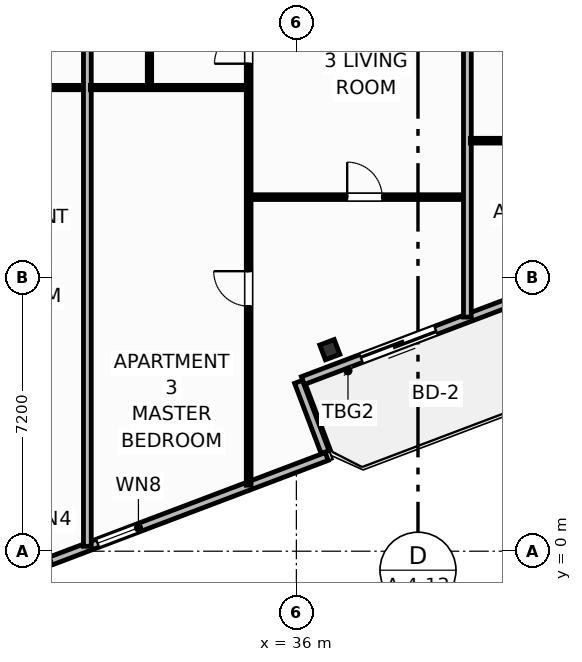
"""IFC4 building model, lengths in metres.
Left out: names, types, materials, properties, quantities, classifications, styles, units other than length and angle.
Written with IfcOpenShell. Run it as: python <this file> out.ifc"""

import sys

from ifc_helpers import new_model, si_unit, direction, frame, frame_2d, origin, origin_2d, place, context, subcontext, project, spatial, rectangle, i_section, extrude, element, fill, save


model = new_model("IFC4")
c1 = context("Model", 3, precision=1e-05, world=origin(), true_north=direction((0.0, 1.0)))
c2 = subcontext(c1, "Body", "Model", "MODEL_VIEW")
j1 = project(units=[si_unit("LENGTHUNIT", "METRE"), si_unit("PLANEANGLEUNIT", "RADIAN")], contexts=[c1])
p1 = place(None, origin())
s1 = spatial("IfcSite", under=j1, at=p1, CompositionType="ELEMENT")
p2 = place(p1, origin())
s2 = spatial("IfcBuilding", under=s1, at=p2, CompositionType="ELEMENT")
p3 = place(p2, frame((0.0, 0.0, 216.4)))
s3 = spatial("IfcBuildingStorey", under=s2, at=p3, CompositionType="ELEMENT", Elevation=216.4)
p4 = place(p3, frame((36.88, 5.303, 0.0), z_axis=(0.0, 0.0, 1.0), x_axis=(0.935221751401, 0.354062530786, 0.0)))
e1 = element("IfcColumn", 1, at=p4, inside=s3, PredefinedType="COLUMN", context=c2, shape_type="SweptSolid", body=[
    extrude(i_section(OverallWidth=0.406, OverallDepth=0.416, WebThickness=0.03, FlangeThickness=0.048, FilletRadius=0.025, at=origin_2d()), origin(), (0.0, 0.0, 1.0), 3.7),
])
p5 = place(p3, frame((41.783, 6.614, 0.0), z_axis=(0.0, 0.0, 1.0), x_axis=(-0.93521416643, -0.354082565101, 0.0)))
e2 = element("IfcWall", 2, at=p5, inside=s3, PredefinedType="SOLIDWALL", context=c2, shape_type="SweptSolid", body=[
    extrude(rectangle(XDim=6.0, YDim=0.22, at=frame_2d((3.0, 0.0))), origin(), (0.0, 0.0, 1.0), 2.73),
])
p6 = place(p5, frame((2.26, 0.0, 0.0)))
e3 = element("IfcOpeningElement", 3, at=p6, cuts=e2, PredefinedType="OPENING", context=c2, shape_type="SweptSolid", body=[
    extrude(rectangle(XDim=2.1, YDim=2.3, at=frame_2d((1.05, 1.15))), frame((0.0, 0.12, 0.0), z_axis=(0.0, -1.0, 0.0), x_axis=(1.0, 0.0, 0.0)), (0.0, 0.0, 1.0), 0.24),
])
p7 = place(p3, frame((20.202, -3.791, 0.0), z_axis=(0.0, 0.0, 1.0), x_axis=(0.935225574232, 0.354052432984, 0.0)))
e4 = element("IfcWall", 4, at=p7, inside=s3, PredefinedType="SOLIDWALL", context=c2, shape_type="SweptSolid", body=[
    extrude(rectangle(XDim=17.747, YDim=0.22, at=frame_2d((8.874, 0.0))), origin(), (0.0, 0.0, 1.0), 2.73),
])
p8 = place(p7, frame((7.823, 0.0, 0.8)))
e5 = element("IfcOpeningElement", 5, at=p8, cuts=e4, PredefinedType="OPENING", context=c2, shape_type="SweptSolid", body=[
    extrude(rectangle(XDim=2.1, YDim=1.75, at=frame_2d((1.05, 0.875))), frame((0.0, 0.12, 0.0), z_axis=(0.0, -1.0, 0.0), x_axis=(1.0, 0.0, 0.0)), (0.0, 0.0, 1.0), 0.24),
])
p9 = place(p7, frame((11.298, 0.0, 0.8)))
e6 = element("IfcOpeningElement", 6, at=p9, cuts=e4, PredefinedType="OPENING", context=c2, shape_type="SweptSolid", body=[
    extrude(rectangle(XDim=1.15, YDim=1.4, at=frame_2d((0.575, 0.7))), frame((0.0, 0.12, 0.0), z_axis=(0.0, -1.0, 0.0), x_axis=(1.0, 0.0, 0.0)), (0.0, 0.0, 1.0), 0.24),
])
p10 = place(p3, frame((36.755, 2.61, 0.0), z_axis=(0.0, 0.0, 1.0), x_axis=(-0.354020680661, 0.935237594232, 0.0)))
e7 = element("IfcWall", 7, at=p10, inside=s3, PredefinedType="SOLIDWALL", context=c2, shape_type="SweptSolid", body=[
    extrude(rectangle(XDim=1.975, YDim=0.22, at=frame_2d((0.988, 0.0))), origin(), (0.0, 0.0, 1.0), 2.73),
])
p11 = place(p3, frame((26.325, 12.2, 0.0), z_axis=(0.0, 0.0, 1.0), x_axis=(1.0, 0.0, 0.0)))
e8 = element("IfcWall", 8, at=p11, inside=s3, PredefinedType="PARTITIONING", context=c2, shape_type="SweptSolid", body=[
    extrude(rectangle(XDim=4.095, YDim=0.115, at=frame_2d((2.047, 0.0))), origin(), (0.0, 0.0, 1.0), 3.45),
])
p12 = place(p3, frame((30.5, 0.129, 0.0), z_axis=(0.0, 0.0, 1.0), x_axis=(0.0, 1.0, 0.0)))
e9 = element("IfcWall", 9, at=p12, inside=s3, PredefinedType="PARTITIONING", context=c2, shape_type="SweptSolid", body=[
    extrude(rectangle(XDim=16.721, YDim=0.205, at=frame_2d((8.36, 0.0))), origin(), (0.0, 0.0, 1.0), 3.45),
])
p13 = place(p3, frame((34.815, 9.317, 0.0), z_axis=(0.0, 0.0, 1.0), x_axis=(1.0, 0.0, 0.0)))
e10 = element("IfcWall", 10, at=p13, inside=s3, PredefinedType="PARTITIONING", context=c2, shape_type="SweptSolid", body=[
    extrude(rectangle(XDim=5.605, YDim=0.125, at=frame_2d((2.803, 0.0))), origin(), (0.0, 0.0, 1.0), 3.45),
])
p14 = place(p13, frame((2.522, 0.0, 0.0)))
e11 = element("IfcOpeningElement", 11, at=p14, cuts=e10, PredefinedType="OPENING", context=c2, shape_type="SweptSolid", body=[
    extrude(rectangle(XDim=0.92, YDim=2.05, at=frame_2d((0.46, 1.025))), frame((0.0, 0.073, 0.0), z_axis=(0.0, -1.0, 0.0), x_axis=(1.0, 0.0, 0.0)), (0.0, 0.0, 1.0), 0.145),
])
p15 = place(p3, frame((34.745, 1.736, 0.0), z_axis=(0.0, 0.0, 1.0), x_axis=(0.0, 1.0, 0.0)))
e12 = element("IfcWall", 12, at=p15, inside=s3, PredefinedType="PARTITIONING", context=c2, shape_type="SweptSolid", body=[
    extrude(rectangle(XDim=15.114, YDim=0.125, at=frame_2d((7.557, 0.0))), origin(), (0.0, 0.0, 1.0), 2.739),
])
p16 = place(p15, frame((4.712, 0.0, 0.0)))
e13 = element("IfcOpeningElement", 13, at=p16, cuts=e12, PredefinedType="OPENING", context=c2, shape_type="SweptSolid", body=[
    extrude(rectangle(XDim=0.92, YDim=2.05, at=frame_2d((0.46, 1.025))), frame((0.0, 0.073, 0.0), z_axis=(0.0, -1.0, 0.0), x_axis=(1.0, 0.0, 0.0)), (0.0, 0.0, 1.0), 0.145),
])
p17 = place(p15, frame((11.091, 0.0, 0.0)))
e14 = element("IfcOpeningElement", 14, at=p17, cuts=e12, PredefinedType="OPENING", context=c2, shape_type="SweptSolid", body=[
    extrude(rectangle(XDim=0.9, YDim=2.05, at=frame_2d((0.45, 1.025))), frame((0.0, 0.073, 0.0), z_axis=(0.0, -1.0, 0.0), x_axis=(1.0, 0.0, 0.0)), (0.0, 0.0, 1.0), 0.145),
])
p18 = place(p15, frame((13.384, 0.0, 0.0)))
e15 = element("IfcOpeningElement", 15, at=p18, cuts=e12, PredefinedType="OPENING", context=c2, shape_type="SweptSolid", body=[
    extrude(rectangle(XDim=0.92, YDim=2.05, at=frame_2d((0.46, 1.025))), frame((0.0, 0.073, 0.0), z_axis=(0.0, -1.0, 0.0), x_axis=(1.0, 0.0, 0.0)), (0.0, 0.0, 1.0), 0.145),
])
p19 = place(p3, frame((30.58, 12.2, 0.0), z_axis=(0.0, 0.0, 1.0), x_axis=(1.0, 0.0, 0.0)))
e16 = element("IfcWall", 16, at=p19, inside=s3, PredefinedType="PARTITIONING", context=c2, shape_type="SweptSolid", body=[
    extrude(rectangle(XDim=4.095, YDim=0.115, at=frame_2d((2.047, 0.0))), origin(), (0.0, 0.0, 1.0), 3.45),
])
p20 = place(p3, frame((32.135, 12.2, 0.0), z_axis=(0.0, 0.0, 1.0), x_axis=(0.0, 1.0, 0.0)))
e17 = element("IfcWall", 17, at=p20, inside=s3, PredefinedType="PARTITIONING", context=c2, shape_type="SweptSolid", body=[
    extrude(rectangle(XDim=2.24, YDim=0.115, at=frame_2d((1.12, 0.0))), origin(), (0.0, 0.0, 1.0), 3.45),
])
p21 = place(p3, frame((40.5, 6.16, 0.0), z_axis=(0.0, 0.0, 1.0), x_axis=(0.0, 1.0, 0.0)))
e18 = element("IfcWall", 18, at=p21, inside=s3, PredefinedType="PARTITIONING", context=c2, shape_type="SweptSolid", body=[
    extrude(rectangle(XDim=10.69, YDim=0.205, at=frame_2d((5.345, 0.0))), origin(), (0.0, 0.0, 1.0), 3.45),
])
p22 = place(p3, frame((40.58, 10.802, 0.0), z_axis=(0.0, 0.0, 1.0), x_axis=(1.0, 0.0, 0.0)))
e19 = element("IfcWall", 19, at=p22, inside=s3, PredefinedType="PARTITIONING", context=c2, shape_type="SweptSolid", body=[
    extrude(rectangle(XDim=5.605, YDim=0.125, at=frame_2d((2.803, 0.0))), origin(), (0.0, 0.0, 1.0), 3.45),
])
p23 = place(p22, frame((2.522, 0.0, 0.0)))
e20 = element("IfcOpeningElement", 20, at=p23, cuts=e19, PredefinedType="OPENING", context=c2, shape_type="SweptSolid", body=[
    extrude(rectangle(XDim=0.92, YDim=2.05, at=frame_2d((0.46, 1.025))), frame((0.0, 0.073, 0.0), z_axis=(0.0, -1.0, 0.0), x_axis=(1.0, 0.0, 0.0)), (0.0, 0.0, 1.0), 0.145),
])
p24 = place(p6, origin())
e21 = element("IfcDoor", 21, at=p24, inside=s3, OperationType="SLIDING_TO_LEFT", PredefinedType="DOOR", context=c2, shape_type="SweptSolid", body=[
    extrude(rectangle(XDim=2.1, YDim=2.3, at=frame_2d((1.05, 1.15))), frame((0.0, 0.025, 0.0), z_axis=(0.0, -1.0, 0.0), x_axis=(1.0, 0.0, 0.0)), (0.0, 0.0, 1.0), 0.05),
])
fill(e3, e21)
p25 = place(p14, origin())
e22 = element("IfcDoor", 22, at=p25, inside=s3, OperationType="SINGLE_SWING_LEFT", PredefinedType="DOOR", context=c2, shape_type="SweptSolid", body=[
    extrude(rectangle(XDim=0.92, YDim=2.05, at=frame_2d((0.46, 1.025))), frame((0.0, 0.025, 0.0), z_axis=(0.0, -1.0, 0.0), x_axis=(1.0, 0.0, 0.0)), (0.0, 0.0, 1.0), 0.05),
])
fill(e11, e22)
p26 = place(p16, origin())
e23 = element("IfcDoor", 23, at=p26, inside=s3, OperationType="SINGLE_SWING_RIGHT", PredefinedType="DOOR", context=c2, shape_type="SweptSolid", body=[
    extrude(rectangle(XDim=0.92, YDim=2.05, at=frame_2d((0.46, 1.025))), frame((0.0, 0.025, 0.0), z_axis=(0.0, -1.0, 0.0), x_axis=(1.0, 0.0, 0.0)), (0.0, 0.0, 1.0), 0.05),
])
fill(e13, e23)
p27 = place(p17, origin())
e24 = element("IfcDoor", 24, at=p27, inside=s3, OperationType="SINGLE_SWING_LEFT", PredefinedType="DOOR", context=c2, shape_type="SweptSolid", body=[
    extrude(rectangle(XDim=0.9, YDim=2.05, at=frame_2d((0.45, 1.025))), frame((0.0, 0.025, 0.0), z_axis=(0.0, -1.0, 0.0), x_axis=(1.0, 0.0, 0.0)), (0.0, 0.0, 1.0), 0.05),
])
fill(e14, e24)
p28 = place(p9, origin())
e25 = element("IfcWindow", 25, at=p28, inside=s3, PartitioningType="SINGLE_PANEL", PredefinedType="WINDOW", context=c2, shape_type="SweptSolid", body=[
    extrude(rectangle(XDim=1.15, YDim=1.4, at=frame_2d((0.575, 0.7))), frame((0.0, 0.03, 0.0), z_axis=(0.0, -1.0, 0.0), x_axis=(1.0, 0.0, 0.0)), (0.0, 0.0, 1.0), 0.06),
])
fill(e6, e25)
save(model, sys.argv[1])
